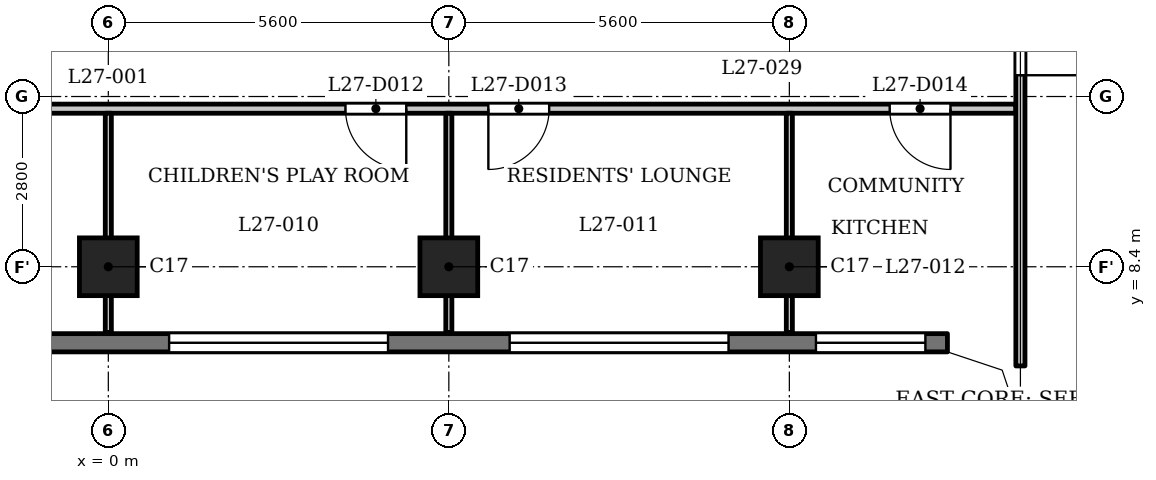
"""IFC4 building model, lengths in metres.
Left out: names, types, materials, properties, quantities, classifications, styles, units other than length and angle.
Written with IfcOpenShell. Run it as: python <this file> out.ifc"""

import sys

from ifc_helpers import new_model, si_unit, direction, frame, frame_2d, origin, origin_2d, place, context, subcontext, project, spatial, polyline, rectangle, outline, extrude, element, fill, save


model = new_model("IFC4")
c1 = context("Model", 3, precision=1e-05, world=origin(), true_north=direction((0.0, 1.0)))
c2 = subcontext(c1, "Body", "Model", "MODEL_VIEW")
j1 = project(units=[si_unit("LENGTHUNIT", "METRE"), si_unit("PLANEANGLEUNIT", "RADIAN")], contexts=[c1])
p1 = place(None, origin())
s1 = spatial("IfcSite", under=j1, at=p1, CompositionType="ELEMENT")
p2 = place(p1, origin())
s2 = spatial("IfcBuilding", under=s1, at=p2, CompositionType="ELEMENT")
p3 = place(p2, frame((0.0, 0.0, 107.8)))
s3 = spatial("IfcBuildingStorey", under=s2, at=p3, CompositionType="ELEMENT", Elevation=107.8)
for number, where, z_axis, x_axis in (
    (1, (0.0, 8.4, 0.0), (0.0, 0.0, 1.0), (1.0, 0.0, 0.0)),
    (2, (5.6, 8.4, 0.0), (0.0, 0.0, 1.0), (1.0, 0.0, 0.0)),
    (3, (11.2, 8.4, 0.0), (0.0, 0.0, 1.0), (1.0, 0.0, 0.0)),
):
    element("IfcColumn", number, at=place(p3, frame(where, z_axis=z_axis, x_axis=x_axis)), inside=s3, PredefinedType="COLUMN", context=c2, shape_type="SweptSolid", body=[
        extrude(rectangle(XDim=0.95, YDim=0.95, at=origin_2d()), origin(), (0.0, 0.0, 1.0), 3.5),
    ])
p4 = place(p3, frame((-13.8, 7.15, 0.0), z_axis=(0.0, 0.0, 1.0), x_axis=(1.0, 0.0, 0.0)))
e4 = element("IfcWall", 4, at=p4, inside=s3, PredefinedType="SOLIDWALL", context=c2, shape_type="SweptSolid", body=[
    extrude(rectangle(XDim=27.6, YDim=0.3, at=frame_2d((13.8, 0.0))), origin(), (0.0, 0.0, 1.0), 3.2),
])
p5 = place(p4, frame((0.363, 0.0, 0.9)))
e5 = element("IfcOpeningElement", 5, at=p5, cuts=e4, PredefinedType="OPENING", context=c2, shape_type="SweptSolid", body=[
    extrude(rectangle(XDim=1.8, YDim=1.25, at=frame_2d((0.9, 0.625))), frame((0.0, 0.16, 0.0), z_axis=(0.0, -1.0, 0.0), x_axis=(1.0, 0.0, 0.0)), (0.0, 0.0, 1.0), 0.32),
])
p6 = place(p4, frame((3.6, 0.0, 1.2)))
e6 = element("IfcOpeningElement", 6, at=p6, cuts=e4, PredefinedType="OPENING", context=c2, shape_type="SweptSolid", body=[
    extrude(rectangle(XDim=3.6, YDim=0.95, at=frame_2d((1.8, 0.475))), frame((0.0, 0.16, 0.0), z_axis=(0.0, -1.0, 0.0), x_axis=(1.0, 0.0, 0.0)), (0.0, 0.0, 1.0), 0.32),
])
p7 = place(p4, frame((9.2, 0.0, 1.2)))
e7 = element("IfcOpeningElement", 7, at=p7, cuts=e4, PredefinedType="OPENING", context=c2, shape_type="SweptSolid", body=[
    extrude(rectangle(XDim=3.6, YDim=0.95, at=frame_2d((1.8, 0.475))), frame((0.0, 0.16, 0.0), z_axis=(0.0, -1.0, 0.0), x_axis=(1.0, 0.0, 0.0)), (0.0, 0.0, 1.0), 0.32),
])
p8 = place(p4, frame((14.8, 0.0, 1.2)))
e8 = element("IfcOpeningElement", 8, at=p8, cuts=e4, PredefinedType="OPENING", context=c2, shape_type="SweptSolid", body=[
    extrude(rectangle(XDim=3.6, YDim=0.95, at=frame_2d((1.8, 0.475))), frame((0.0, 0.16, 0.0), z_axis=(0.0, -1.0, 0.0), x_axis=(1.0, 0.0, 0.0)), (0.0, 0.0, 1.0), 0.32),
])
p9 = place(p4, frame((20.4, 0.0, 1.2)))
e9 = element("IfcOpeningElement", 9, at=p9, cuts=e4, PredefinedType="OPENING", context=c2, shape_type="SweptSolid", body=[
    extrude(rectangle(XDim=3.6, YDim=0.95, at=frame_2d((1.8, 0.475))), frame((0.0, 0.16, 0.0), z_axis=(0.0, -1.0, 0.0), x_axis=(1.0, 0.0, 0.0)), (0.0, 0.0, 1.0), 0.32),
])
p10 = place(p4, frame((25.438, 0.0, 0.9)))
e10 = element("IfcOpeningElement", 10, at=p10, cuts=e4, PredefinedType="OPENING", context=c2, shape_type="SweptSolid", body=[
    extrude(rectangle(XDim=1.8, YDim=1.25, at=frame_2d((0.9, 0.625))), frame((0.0, 0.16, 0.0), z_axis=(0.0, -1.0, 0.0), x_axis=(1.0, 0.0, 0.0)), (0.0, 0.0, 1.0), 0.32),
])
p11 = place(p3, frame((-14.925, 11.0, 0.0), z_axis=(0.0, 0.0, 1.0), x_axis=(1.0, 0.0, 0.0)))
e11 = element("IfcWall", 11, at=p11, inside=s3, PredefinedType="PARTITIONING", context=c2, shape_type="SweptSolid", body=[
    extrude(rectangle(XDim=29.85, YDim=0.15, at=frame_2d((14.925, 0.0))), origin(), (0.0, 0.0, 1.0), 3.2),
])
p12 = place(p11, frame((1.076, 0.0, 0.0)))
e12 = element("IfcOpeningElement", 12, at=p12, cuts=e11, PredefinedType="OPENING", context=c2, shape_type="SweptSolid", body=[
    extrude(rectangle(XDim=1.0, YDim=2.1, at=frame_2d((0.5, 1.05))), frame((0.0, 0.085, 0.0), z_axis=(0.0, -1.0, 0.0), x_axis=(1.0, 0.0, 0.0)), (0.0, 0.0, 1.0), 0.17),
])
p13 = place(p11, frame((7.625, 0.0, 0.0)))
e13 = element("IfcOpeningElement", 13, at=p13, cuts=e11, PredefinedType="OPENING", context=c2, shape_type="SweptSolid", body=[
    extrude(rectangle(XDim=1.0, YDim=2.1, at=frame_2d((0.5, 1.05))), frame((0.0, 0.085, 0.0), z_axis=(0.0, -1.0, 0.0), x_axis=(1.0, 0.0, 0.0)), (0.0, 0.0, 1.0), 0.17),
])
p14 = place(p11, frame((9.975, 0.0, 0.0)))
e14 = element("IfcOpeningElement", 14, at=p14, cuts=e11, PredefinedType="OPENING", context=c2, shape_type="SweptSolid", body=[
    extrude(rectangle(XDim=1.0, YDim=2.1, at=frame_2d((0.5, 1.05))), frame((0.0, 0.085, 0.0), z_axis=(0.0, -1.0, 0.0), x_axis=(1.0, 0.0, 0.0)), (0.0, 0.0, 1.0), 0.17),
])
p15 = place(p11, frame((18.825, 0.0, 0.0)))
e15 = element("IfcOpeningElement", 15, at=p15, cuts=e11, PredefinedType="OPENING", context=c2, shape_type="SweptSolid", body=[
    extrude(rectangle(XDim=1.0, YDim=2.1, at=frame_2d((0.5, 1.05))), frame((0.0, 0.085, 0.0), z_axis=(0.0, -1.0, 0.0), x_axis=(1.0, 0.0, 0.0)), (0.0, 0.0, 1.0), 0.17),
])
p16 = place(p11, frame((21.175, 0.0, 0.0)))
e16 = element("IfcOpeningElement", 16, at=p16, cuts=e11, PredefinedType="OPENING", context=c2, shape_type="SweptSolid", body=[
    extrude(rectangle(XDim=1.0, YDim=2.1, at=frame_2d((0.5, 1.05))), frame((0.0, 0.085, 0.0), z_axis=(0.0, -1.0, 0.0), x_axis=(1.0, 0.0, 0.0)), (0.0, 0.0, 1.0), 0.17),
])
p17 = place(p11, frame((27.775, 0.0, 0.0)))
e17 = element("IfcOpeningElement", 17, at=p17, cuts=e11, PredefinedType="OPENING", context=c2, shape_type="SweptSolid", body=[
    extrude(rectangle(XDim=1.0, YDim=2.1, at=frame_2d((0.5, 1.05))), frame((0.0, 0.085, 0.0), z_axis=(0.0, -1.0, 0.0), x_axis=(1.0, 0.0, 0.0)), (0.0, 0.0, 1.0), 0.17),
])
for number, where, z_axis, x_axis in (
    (18, (0.0, 7.32, 0.0), (0.0, 0.0, 1.0), (0.0, 1.0, 0.0)),
    (19, (5.6, 7.32, 0.0), (0.0, 0.0, 1.0), (0.0, 1.0, 0.0)),
    (20, (11.2, 7.32, 0.0), (0.0, 0.0, 1.0), (0.0, 1.0, 0.0)),
):
    element("IfcWall", number, at=place(p3, frame(where, z_axis=z_axis, x_axis=x_axis)), inside=s3, PredefinedType="PARTITIONING", context=c2, shape_type="SweptSolid", body=[
        extrude(rectangle(XDim=3.605, YDim=0.1, at=frame_2d((1.802, 0.0))), origin(), (0.0, 0.0, 1.0), 3.2),
    ])
p18 = place(p3, frame((15.0, 6.769, 0.0), z_axis=(0.0, 0.0, 1.0), x_axis=(0.0, 1.0, 0.0)))
e21 = element("IfcWall", 21, at=p18, inside=s3, PredefinedType="PARTITIONING", context=c2, shape_type="SweptSolid", body=[
    extrude(rectangle(XDim=6.356, YDim=0.15, at=frame_2d((3.178, 0.0))), origin(), (0.0, 0.0, 1.0), 3.2),
])
p19 = place(p18, frame((4.781, 0.0, 0.0)))
e22 = element("IfcOpeningElement", 22, at=p19, cuts=e21, PredefinedType="OPENING", context=c2, shape_type="SweptSolid", body=[
    extrude(rectangle(XDim=1.0, YDim=2.1, at=frame_2d((0.5, 1.05))), frame((0.0, 0.085, 0.0), z_axis=(0.0, -1.0, 0.0), x_axis=(1.0, 0.0, 0.0)), (0.0, 0.0, 1.0), 0.17),
])
p20 = place(p3, origin())
e23 = element("IfcWall", 23, at=p20, inside=s3, PredefinedType="SOLIDWALL", context=c2, shape_type="SweptSolid", body=[
    extrude(outline(polyline([(14.937, 6.937), (13.849, 7.3), (13.8, 7.3), (13.8, 7.0), (14.7, 6.7), (15.0, 5.8), (15.3, 5.8), (15.3, 5.849), (14.937, 6.937)])), origin(), (0.0, 0.0, 1.0), 3.2),
])
p21 = place(p19, origin())
e24 = element("IfcDoor", 24, at=p21, inside=s3, OperationType="SINGLE_SWING_LEFT", PredefinedType="DOOR", context=c2, shape_type="SweptSolid", body=[
    extrude(rectangle(XDim=1.0, YDim=2.1, at=frame_2d((0.5, 1.05))), frame((0.0, 0.025, 0.0), z_axis=(0.0, -1.0, 0.0), x_axis=(1.0, 0.0, 0.0)), (0.0, 0.0, 1.0), 0.05),
])
fill(e22, e24)
p22 = place(p15, origin())
e25 = element("IfcDoor", 25, at=p22, inside=s3, OperationType="SINGLE_SWING_RIGHT", PredefinedType="DOOR", context=c2, shape_type="SweptSolid", body=[
    extrude(rectangle(XDim=1.0, YDim=2.1, at=frame_2d((0.5, 1.05))), frame((0.0, 0.025, 0.0), z_axis=(0.0, -1.0, 0.0), x_axis=(1.0, 0.0, 0.0)), (0.0, 0.0, 1.0), 0.05),
])
fill(e15, e25)
p23 = place(p16, origin())
e26 = element("IfcDoor", 26, at=p23, inside=s3, OperationType="SINGLE_SWING_LEFT", PredefinedType="DOOR", context=c2, shape_type="SweptSolid", body=[
    extrude(rectangle(XDim=1.0, YDim=2.1, at=frame_2d((0.5, 1.05))), frame((0.0, 0.025, 0.0), z_axis=(0.0, -1.0, 0.0), x_axis=(1.0, 0.0, 0.0)), (0.0, 0.0, 1.0), 0.05),
])
fill(e16, e26)
p24 = place(p17, origin())
e27 = element("IfcDoor", 27, at=p24, inside=s3, OperationType="SINGLE_SWING_RIGHT", PredefinedType="DOOR", context=c2, shape_type="SweptSolid", body=[
    extrude(rectangle(XDim=1.0, YDim=2.1, at=frame_2d((0.5, 1.05))), frame((0.0, 0.025, 0.0), z_axis=(0.0, -1.0, 0.0), x_axis=(1.0, 0.0, 0.0)), (0.0, 0.0, 1.0), 0.05),
])
fill(e17, e27)
p25 = place(p8, origin())
e28 = element("IfcWindow", 28, at=p25, inside=s3, PartitioningType="SINGLE_PANEL", PredefinedType="WINDOW", context=c2, shape_type="SweptSolid", body=[
    extrude(rectangle(XDim=3.6, YDim=0.95, at=frame_2d((1.8, 0.475))), frame((0.0, 0.03, 0.0), z_axis=(0.0, -1.0, 0.0), x_axis=(1.0, 0.0, 0.0)), (0.0, 0.0, 1.0), 0.06),
])
fill(e8, e28)
p26 = place(p9, origin())
e29 = element("IfcWindow", 29, at=p26, inside=s3, PartitioningType="SINGLE_PANEL", PredefinedType="WINDOW", context=c2, shape_type="SweptSolid", body=[
    extrude(rectangle(XDim=3.6, YDim=0.95, at=frame_2d((1.8, 0.475))), frame((0.0, 0.03, 0.0), z_axis=(0.0, -1.0, 0.0), x_axis=(1.0, 0.0, 0.0)), (0.0, 0.0, 1.0), 0.06),
])
fill(e9, e29)
p27 = place(p10, origin())
e30 = element("IfcWindow", 30, at=p27, inside=s3, PartitioningType="SINGLE_PANEL", PredefinedType="WINDOW", context=c2, shape_type="SweptSolid", body=[
    extrude(rectangle(XDim=1.8, YDim=1.25, at=frame_2d((0.9, 0.625))), frame((0.0, 0.03, 0.0), z_axis=(0.0, -1.0, 0.0), x_axis=(1.0, 0.0, 0.0)), (0.0, 0.0, 1.0), 0.06),
])
fill(e10, e30)
save(model, sys.argv[1])
